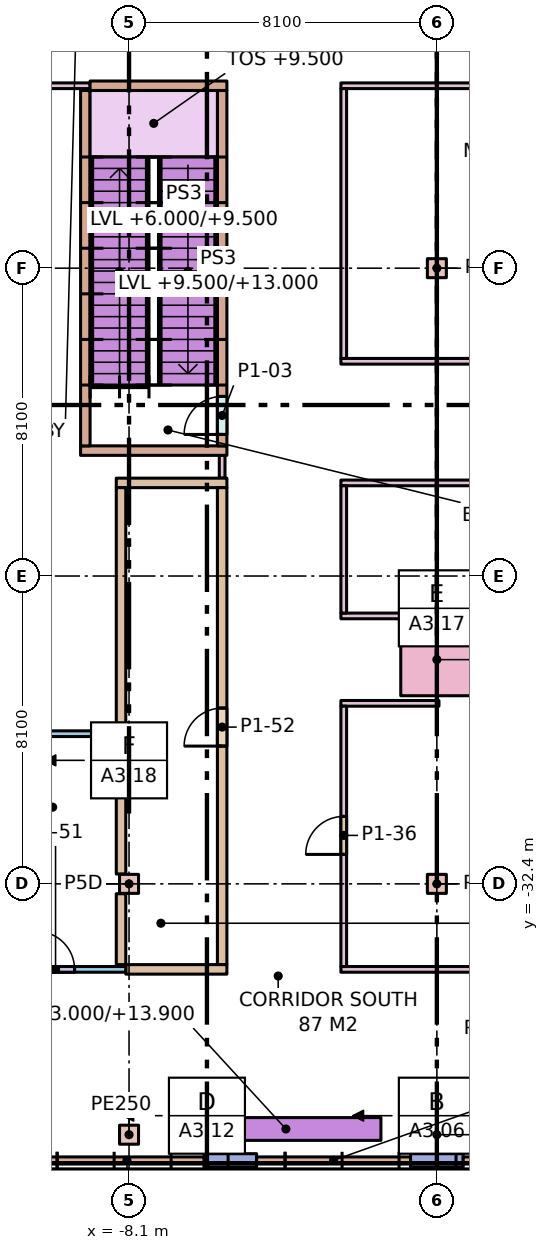
"""IFC4 building model, lengths in metres.
Left out: names, types, materials, properties, quantities, classifications, styles, units other than length and angle.
Written with IfcOpenShell. Run it as: python <this file> out.ifc"""

import sys

from ifc_helpers import new_model, si_unit, direction, frame, frame_2d, origin, origin_2d, place, context, subcontext, project, spatial, rectangle, extrude, element, fill, save


model = new_model("IFC4")
c1 = context("Model", 3, precision=1e-05, world=origin(), true_north=direction((0.0, 1.0)))
c2 = subcontext(c1, "Body", "Model", "MODEL_VIEW")
j1 = project(units=[si_unit("LENGTHUNIT", "METRE"), si_unit("PLANEANGLEUNIT", "RADIAN")], contexts=[c1])
p1 = place(None, origin())
s1 = spatial("IfcSite", under=j1, at=p1, CompositionType="ELEMENT")
p2 = place(p1, origin())
s2 = spatial("IfcBuilding", under=s1, at=p2, CompositionType="ELEMENT")
p3 = place(p2, frame((0.0, 0.0, 6.0)))
s3 = spatial("IfcBuildingStorey", under=s2, at=p3, CompositionType="ELEMENT", Elevation=6.0)
for number, where, z_axis, x_axis in (
    (1, (-8.1, -32.4, 0.0), (0.0, 0.0, 1.0), (1.0, 0.0, 0.0)),
    (2, (0.0, -32.4, 0.0), (0.0, 0.0, 1.0), (1.0, 0.0, 0.0)),
    (3, (0.0, -16.2, 0.0), (0.0, 0.0, 1.0), (1.0, 0.0, 0.0)),
    (4, (0.0, -39.0, 0.0), (0.0, 0.0, 1.0), (1.0, 0.0, 0.0)),
    (5, (-8.1, -39.0, 0.0), (0.0, 0.0, 1.0), (1.0, 0.0, 0.0)),
):
    element("IfcColumn", number, at=place(p3, frame(where, z_axis=z_axis, x_axis=x_axis)), inside=s3, PredefinedType="COLUMN", context=c2, shape_type="SweptSolid", body=[
        extrude(rectangle(XDim=0.5, YDim=0.5, at=origin_2d()), origin(), (0.0, 0.0, 1.0), 7.0),
    ])
p4 = place(p3, frame((0.0, -26.5, 0.0), z_axis=(0.0, 0.0, 1.0), x_axis=(1.0, 0.0, 0.0)))
e6 = element("IfcColumn", 6, at=p4, inside=s3, PredefinedType="COLUMN", context=c2, shape_type="SweptSolid", body=[
    extrude(rectangle(XDim=1.9, YDim=1.9, at=origin_2d()), origin(), (0.0, 0.0, 1.0), 7.0),
])
for number, where, z_axis, x_axis in (
    (7, (-6.129, -39.675, 0.0), (0.0, 0.0, 1.0), (1.0, 0.0, 0.0)),
    (8, (-0.693, -39.675, 0.0), (0.0, 0.0, 1.0), (1.0, 0.0, 0.0)),
):
    element("IfcWall", number, at=place(p3, frame(where, z_axis=z_axis, x_axis=x_axis)), inside=s3, PredefinedType="STANDARD", context=c2, shape_type="SweptSolid", body=[
        extrude(rectangle(XDim=1.386, YDim=0.35, at=frame_2d((0.693, 0.0))), origin(), (0.0, 0.0, 1.0), 6.68),
    ])
p5 = place(p3, frame((-6.472, -38.85, 7.0), z_axis=(0.0, 0.0, 1.0), x_axis=(1.0, 0.0, 0.0)))
e9 = element("IfcWall", 9, at=p5, inside=s3, PredefinedType="PARAPET", context=c2, shape_type="SweptSolid", body=[
    extrude(rectangle(XDim=5.0, YDim=0.6, at=frame_2d((2.5, 0.0))), origin(), (0.0, 0.0, 1.0), 0.9),
])
p6 = place(p3, frame((-9.375, -21.0, 0.0), z_axis=(0.0, 0.0, 1.0), x_axis=(1.0, 0.0, 0.0)))
e10 = element("IfcWall", 10, at=p6, inside=s3, PredefinedType="STANDARD", context=c2, shape_type="SweptSolid", body=[
    extrude(rectangle(XDim=3.85, YDim=0.25, at=frame_2d((1.925, 0.0))), origin(), (0.0, 0.0, 1.0), 6.68),
])
p7 = place(p3, frame((-9.25, -20.875, 0.0), z_axis=(0.0, 0.0, 1.0), x_axis=(0.0, 1.0, 0.0)))
e11 = element("IfcWall", 11, at=p7, inside=s3, PredefinedType="STANDARD", context=c2, shape_type="SweptSolid", body=[
    extrude(rectangle(XDim=9.35, YDim=0.25, at=frame_2d((4.675, 0.0))), origin(), (0.0, 0.0, 1.0), 6.68),
])
p8 = place(p3, frame((-13.475, -11.4, 0.0), z_axis=(0.0, 0.0, 1.0), x_axis=(1.0, 0.0, 0.0)))
e12 = element("IfcWall", 12, at=p8, inside=s3, PredefinedType="PARTITIONING", context=c2, shape_type="SweptSolid", body=[
    extrude(rectangle(XDim=4.35, YDim=0.15, at=frame_2d((2.175, 0.0))), origin(), (0.0, 0.0, 1.0), 6.68),
])
p9 = place(p8, frame((1.65, 0.0, 0.0)))
e13 = element("IfcOpeningElement", 13, at=p9, cuts=e12, PredefinedType="OPENING", context=c2, shape_type="SweptSolid", body=[
    extrude(rectangle(XDim=1.0, YDim=2.1, at=frame_2d((0.5, 1.05))), frame((0.0, 0.085, 0.0), z_axis=(0.0, -1.0, 0.0), x_axis=(1.0, 0.0, 0.0)), (0.0, 0.0, 1.0), 0.17),
])
p10 = place(p3, frame((-5.65, -21.725, 0.0), z_axis=(0.0, 0.0, 1.0), x_axis=(0.0, 1.0, 0.0)))
e14 = element("IfcWall", 14, at=p10, inside=s3, PredefinedType="PARTITIONING", context=c2, shape_type="SweptSolid", body=[
    extrude(rectangle(XDim=0.6, YDim=0.15, at=frame_2d((0.3, 0.0))), origin(), (0.0, 0.0, 1.0), 6.68),
])
p11 = place(p3, frame((-11.784, -28.449, 0.0), z_axis=(0.0, 0.0, 1.0), x_axis=(1.0, 0.0, 0.0)))
e15 = element("IfcWall", 15, at=p11, inside=s3, PredefinedType="PARTITIONING", context=c2, shape_type="SweptSolid", body=[
    extrude(rectangle(XDim=3.348, YDim=0.15, at=frame_2d((1.674, 0.0))), origin(), (0.0, 0.0, 1.0), 6.68),
])
p12 = place(p3, frame((-8.436, -21.85, 0.0), z_axis=(0.0, 0.0, 1.0), x_axis=(1.0, 0.0, 0.0)))
e16 = element("IfcWall", 16, at=p12, inside=s3, PredefinedType="PARTITIONING", context=c2, shape_type="SweptSolid", body=[
    extrude(rectangle(XDim=2.911, YDim=0.25, at=frame_2d((1.456, 0.0))), origin(), (0.0, 0.0, 1.0), 6.68),
])
p13 = place(p3, frame((-2.525, -21.85, 0.0), z_axis=(0.0, 0.0, 1.0), x_axis=(1.0, 0.0, 0.0)))
e17 = element("IfcWall", 17, at=p13, inside=s3, PredefinedType="PARTITIONING", context=c2, shape_type="SweptSolid", body=[
    extrude(rectangle(XDim=25.378, YDim=0.15, at=frame_2d((12.689, 0.0))), origin(), (0.0, 0.0, 1.0), 6.68),
])
p14 = place(p13, frame((18.574, 0.0, 0.0)))
e18 = element("IfcOpeningElement", 18, at=p14, cuts=e17, PredefinedType="OPENING", context=c2, shape_type="SweptSolid", body=[
    extrude(rectangle(XDim=1.0, YDim=2.1, at=frame_2d((0.5, 1.05))), frame((0.0, 0.085, 0.0), z_axis=(0.0, -1.0, 0.0), x_axis=(1.0, 0.0, 0.0)), (0.0, 0.0, 1.0), 0.17),
])
p15 = place(p3, frame((-2.525, -34.65, 0.0), z_axis=(0.0, 0.0, 1.0), x_axis=(1.0, 0.0, 0.0)))
e19 = element("IfcWall", 19, at=p15, inside=s3, PredefinedType="PARTITIONING", context=c2, shape_type="SweptSolid", body=[
    extrude(rectangle(XDim=25.378, YDim=0.15, at=frame_2d((12.689, 0.0))), origin(), (0.0, 0.0, 1.0), 6.68),
])
for number, where, z_axis, x_axis in (
    (20, (-2.525, -27.65, 0.0), (0.0, 0.0, 1.0), (1.0, 0.0, 0.0)),
    (21, (-2.525, -25.35, 0.0), (0.0, 0.0, 1.0), (1.0, 0.0, 0.0)),
):
    element("IfcWall", number, at=place(p3, frame(where, z_axis=z_axis, x_axis=x_axis)), inside=s3, PredefinedType="PARTITIONING", context=c2, shape_type="SweptSolid", body=[
        extrude(rectangle(XDim=2.58, YDim=0.15, at=frame_2d((1.29, 0.0))), origin(), (0.0, 0.0, 1.0), 6.68),
    ])
p16 = place(p3, frame((-2.45, -34.575, 0.0), z_axis=(0.0, 0.0, 1.0), x_axis=(0.0, 1.0, 0.0)))
e22 = element("IfcWall", 22, at=p16, inside=s3, PredefinedType="PARTITIONING", context=c2, shape_type="SweptSolid", body=[
    extrude(rectangle(XDim=6.85, YDim=0.15, at=frame_2d((3.425, 0.0))), origin(), (0.0, 0.0, 1.0), 6.68),
])
p17 = place(p16, frame((2.95, 0.0, 0.0)))
e23 = element("IfcOpeningElement", 23, at=p17, cuts=e22, PredefinedType="OPENING", context=c2, shape_type="SweptSolid", body=[
    extrude(rectangle(XDim=1.0, YDim=2.1, at=frame_2d((0.5, 1.05))), frame((0.0, 0.085, 0.0), z_axis=(0.0, -1.0, 0.0), x_axis=(1.0, 0.0, 0.0)), (0.0, 0.0, 1.0), 0.17),
])
p18 = place(p3, frame((-2.45, -25.275, 0.0), z_axis=(0.0, 0.0, 1.0), x_axis=(0.0, 1.0, 0.0)))
e24 = element("IfcWall", 24, at=p18, inside=s3, PredefinedType="PARTITIONING", context=c2, shape_type="SweptSolid", body=[
    extrude(rectangle(XDim=3.35, YDim=0.15, at=frame_2d((1.675, 0.0))), origin(), (0.0, 0.0, 1.0), 6.68),
])
p19 = place(p3, frame((-9.125, -11.4, 0.0), z_axis=(0.0, 0.0, 1.0), x_axis=(1.0, 0.0, 0.0)))
e25 = element("IfcWall", 25, at=p19, inside=s3, PredefinedType="STANDARD", context=c2, shape_type="SweptSolid", body=[
    extrude(rectangle(XDim=3.6, YDim=0.25, at=frame_2d((1.8, 0.0))), origin(), (0.0, 0.0, 1.0), 6.68),
])
p20 = place(p3, frame((-5.65, -20.875, 0.0), z_axis=(0.0, 0.0, 1.0), x_axis=(0.0, 1.0, 0.0)))
e26 = element("IfcWall", 26, at=p20, inside=s3, PredefinedType="STANDARD", context=c2, shape_type="SweptSolid", body=[
    extrude(rectangle(XDim=9.35, YDim=0.25, at=frame_2d((4.675, 0.0))), origin(), (0.0, 0.0, 1.0), 6.68),
])
p21 = place(p20, frame((0.3, 0.0, 0.0)))
e27 = element("IfcOpeningElement", 27, at=p21, cuts=e26, PredefinedType="OPENING", context=c2, shape_type="SweptSolid", body=[
    extrude(rectangle(XDim=1.0, YDim=2.1, at=frame_2d((0.5, 1.05))), frame((0.0, 0.135, 0.0), z_axis=(0.0, -1.0, 0.0), x_axis=(1.0, 0.0, 0.0)), (0.0, 0.0, 1.0), 0.27),
])
p22 = place(p3, frame((-2.525, -11.4, 0.0), z_axis=(0.0, 0.0, 1.0), x_axis=(1.0, 0.0, 0.0)))
e28 = element("IfcWall", 28, at=p22, inside=s3, PredefinedType="PARTITIONING", context=c2, shape_type="SweptSolid", body=[
    extrude(rectangle(XDim=16.05, YDim=0.15, at=frame_2d((8.025, 0.0))), origin(), (0.0, 0.0, 1.0), 6.68),
])
p23 = place(p3, frame((-2.525, -18.65, 0.0), z_axis=(0.0, 0.0, 1.0), x_axis=(1.0, 0.0, 0.0)))
e29 = element("IfcWall", 29, at=p23, inside=s3, PredefinedType="PARTITIONING", context=c2, shape_type="SweptSolid", body=[
    extrude(rectangle(XDim=20.303, YDim=0.15, at=frame_2d((10.152, 0.0))), origin(), (0.0, 0.0, 1.0), 6.68),
])
p24 = place(p23, frame((9.65, 0.0, 0.0)))
e30 = element("IfcOpeningElement", 30, at=p24, cuts=e29, PredefinedType="OPENING", context=c2, shape_type="SweptSolid", body=[
    extrude(rectangle(XDim=1.0, YDim=2.1, at=frame_2d((0.5, 1.05))), frame((0.0, 0.085, 0.0), z_axis=(0.0, -1.0, 0.0), x_axis=(1.0, 0.0, 0.0)), (0.0, 0.0, 1.0), 0.17),
])
p25 = place(p3, frame((-2.45, -18.575, 0.0), z_axis=(0.0, 0.0, 1.0), x_axis=(0.0, 1.0, 0.0)))
e31 = element("IfcWall", 31, at=p25, inside=s3, PredefinedType="PARTITIONING", context=c2, shape_type="SweptSolid", body=[
    extrude(rectangle(XDim=7.1, YDim=0.15, at=frame_2d((3.55, 0.0))), origin(), (0.0, 0.0, 1.0), 6.68),
])
p26 = place(p3, frame((-5.65, -34.525, 0.0), z_axis=(0.0, 0.0, 1.0), x_axis=(0.0, 1.0, 0.0)))
e32 = element("IfcWall", 32, at=p26, inside=s3, PredefinedType="PARTITIONING", context=c2, shape_type="SweptSolid", body=[
    extrude(rectangle(XDim=12.55, YDim=0.25, at=frame_2d((6.275, 0.0))), origin(), (0.0, 0.0, 1.0), 6.68),
])
p27 = place(p26, frame((5.75, 0.0, 0.0)))
e33 = element("IfcOpeningElement", 33, at=p27, cuts=e32, PredefinedType="OPENING", context=c2, shape_type="SweptSolid", body=[
    extrude(rectangle(XDim=1.0, YDim=2.1, at=frame_2d((0.5, 1.05))), frame((0.0, 0.135, 0.0), z_axis=(0.0, -1.0, 0.0), x_axis=(1.0, 0.0, 0.0)), (0.0, 0.0, 1.0), 0.27),
])
p28 = place(p3, frame((-8.186, -34.65, 0.0), z_axis=(0.0, 0.0, 1.0), x_axis=(1.0, 0.0, 0.0)))
e34 = element("IfcWall", 34, at=p28, inside=s3, PredefinedType="PARTITIONING", context=c2, shape_type="SweptSolid", body=[
    extrude(rectangle(XDim=2.661, YDim=0.25, at=frame_2d((1.331, 0.0))), origin(), (0.0, 0.0, 1.0), 6.68),
])
p29 = place(p3, frame((-15.686, -34.65, 0.0), z_axis=(0.0, 0.0, 1.0), x_axis=(1.0, 0.0, 0.0)))
e35 = element("IfcWall", 35, at=p29, inside=s3, PredefinedType="PARTITIONING", context=c2, shape_type="SweptSolid", body=[
    extrude(rectangle(XDim=7.5, YDim=0.15, at=frame_2d((3.75, 0.0))), origin(), (0.0, 0.0, 1.0), 6.68),
])
p30 = place(p29, frame((1.45, 0.0, 0.0)))
e36 = element("IfcOpeningElement", 36, at=p30, cuts=e35, PredefinedType="OPENING", context=c2, shape_type="SweptSolid", body=[
    extrude(rectangle(XDim=1.0, YDim=2.1, at=frame_2d((0.5, 1.05))), frame((0.0, 0.085, 0.0), z_axis=(0.0, -1.0, 0.0), x_axis=(1.0, 0.0, 0.0)), (0.0, 0.0, 1.0), 0.17),
])
p31 = place(p29, frame((5.153, 0.0, 0.0)))
e37 = element("IfcOpeningElement", 37, at=p31, cuts=e35, PredefinedType="OPENING", context=c2, shape_type="SweptSolid", body=[
    extrude(rectangle(XDim=1.0, YDim=2.1, at=frame_2d((0.5, 1.05))), frame((0.0, 0.085, 0.0), z_axis=(0.0, -1.0, 0.0), x_axis=(1.0, 0.0, 0.0)), (0.0, 0.0, 1.0), 0.17),
])
p32 = place(p3, frame((-8.311, -34.525, 0.0), z_axis=(0.0, 0.0, 1.0), x_axis=(0.0, 1.0, 0.0)))
e38 = element("IfcWall", 38, at=p32, inside=s3, PredefinedType="PARTITIONING", context=c2, shape_type="SweptSolid", body=[
    extrude(rectangle(XDim=1.865, YDim=0.25, at=frame_2d((0.933, 0.0))), origin(), (0.0, 0.0, 1.0), 6.68),
])
p33 = place(p3, frame((-8.311, -32.14, 0.0), z_axis=(0.0, 0.0, 1.0), x_axis=(0.0, 1.0, 0.0)))
e39 = element("IfcWall", 39, at=p33, inside=s3, PredefinedType="PARTITIONING", context=c2, shape_type="SweptSolid", body=[
    extrude(rectangle(XDim=10.165, YDim=0.25, at=frame_2d((5.083, 0.0))), origin(), (0.0, 0.0, 1.0), 6.68),
])
p34 = place(p21, origin())
e40 = element("IfcDoor", 40, at=p34, inside=s3, OperationType="SINGLE_SWING_LEFT", PredefinedType="DOOR", context=c2, shape_type="SweptSolid", body=[
    extrude(rectangle(XDim=1.0, YDim=2.1, at=frame_2d((0.5, 1.05))), frame((0.0, 0.025, 0.0), z_axis=(0.0, -1.0, 0.0), x_axis=(1.0, 0.0, 0.0)), (0.0, 0.0, 1.0), 0.05),
])
fill(e27, e40)
p35 = place(p17, origin())
e41 = element("IfcDoor", 41, at=p35, inside=s3, OperationType="SINGLE_SWING_LEFT", PredefinedType="DOOR", context=c2, shape_type="SweptSolid", body=[
    extrude(rectangle(XDim=1.0, YDim=2.1, at=frame_2d((0.5, 1.05))), frame((0.0, 0.025, 0.0), z_axis=(0.0, -1.0, 0.0), x_axis=(1.0, 0.0, 0.0)), (0.0, 0.0, 1.0), 0.05),
])
fill(e23, e41)
p36 = place(p31, origin())
e42 = element("IfcDoor", 42, at=p36, inside=s3, OperationType="SINGLE_SWING_LEFT", PredefinedType="DOOR", context=c2, shape_type="SweptSolid", body=[
    extrude(rectangle(XDim=1.0, YDim=2.1, at=frame_2d((0.5, 1.05))), frame((0.0, 0.025, 0.0), z_axis=(0.0, -1.0, 0.0), x_axis=(1.0, 0.0, 0.0)), (0.0, 0.0, 1.0), 0.05),
])
fill(e37, e42)
p37 = place(p27, origin())
e43 = element("IfcDoor", 43, at=p37, inside=s3, OperationType="SINGLE_SWING_LEFT", PredefinedType="DOOR", context=c2, shape_type="SweptSolid", body=[
    extrude(rectangle(XDim=1.0, YDim=2.1, at=frame_2d((0.5, 1.05))), frame((0.0, 0.025, 0.0), z_axis=(0.0, -1.0, 0.0), x_axis=(1.0, 0.0, 0.0)), (0.0, 0.0, 1.0), 0.05),
])
fill(e33, e43)
save(model, sys.argv[1])
